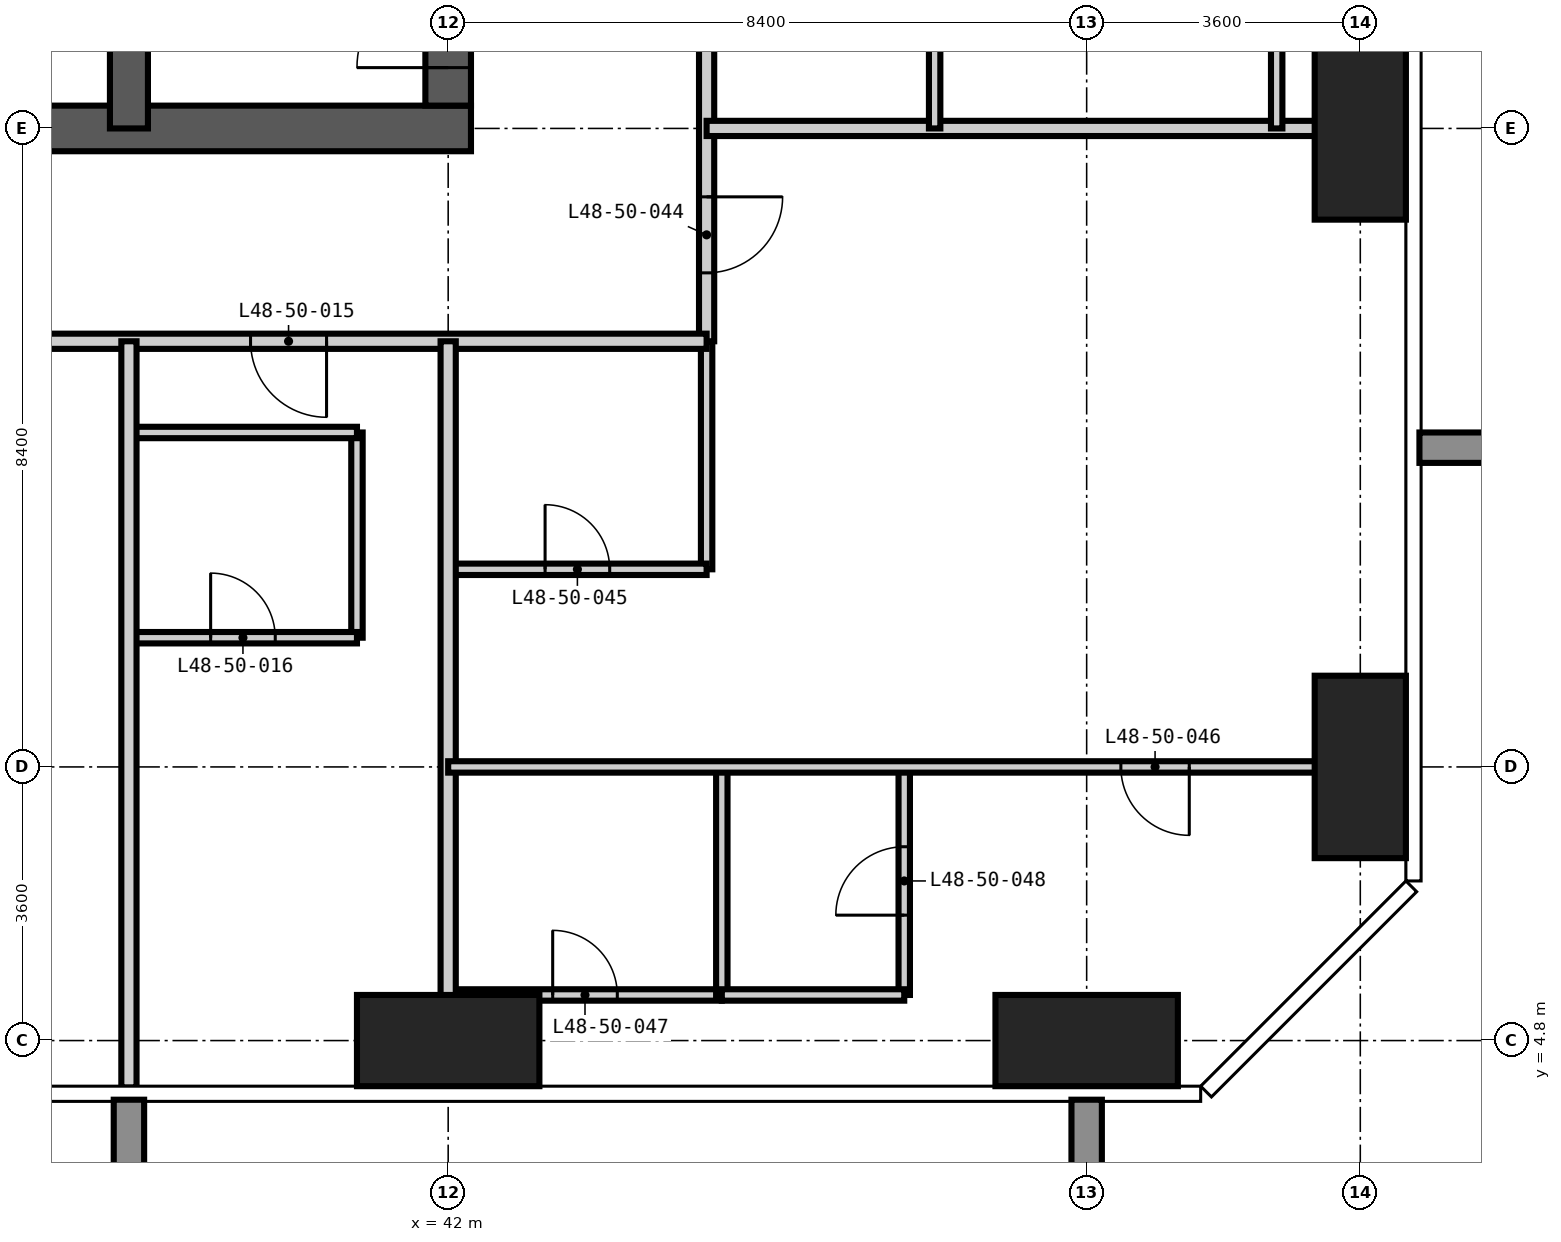
"""IFC4 building model, lengths in metres.
Left out: names, types, materials, properties, quantities, classifications, styles, units other than length and angle.
Written with IfcOpenShell. Run it as: python <this file> out.ifc"""

import sys

from ifc_helpers import new_model, si_unit, direction, frame, frame_2d, origin, origin_2d, place, context, subcontext, project, spatial, rectangle, extrude, element, fill, save


model = new_model("IFC4")
c1 = context("Model", 3, precision=1e-05, world=origin(), true_north=direction((0.0, 1.0)))
c2 = subcontext(c1, "Body", "Model", "MODEL_VIEW")
j1 = project(units=[si_unit("LENGTHUNIT", "METRE"), si_unit("PLANEANGLEUNIT", "RADIAN")], contexts=[c1])
p1 = place(None, origin())
s1 = spatial("IfcSite", under=j1, at=p1, CompositionType="ELEMENT")
p2 = place(p1, origin())
s2 = spatial("IfcBuilding", under=s1, at=p2, CompositionType="ELEMENT")
p3 = place(p2, frame((0.0, 0.0, 187.8)))
s3 = spatial("IfcBuildingStorey", under=s2, at=p3, CompositionType="ELEMENT", Elevation=187.8)
for number, where, z_axis, x_axis in (
    (1, (42.0, 4.8, -0.35), (0.0, 0.0, 1.0), (1.0, 0.0, 0.0)),
    (2, (50.4, 4.8, -0.35), (0.0, 0.0, 1.0), (1.0, 0.0, 0.0)),
):
    element("IfcColumn", number, at=place(p3, frame(where, z_axis=z_axis, x_axis=x_axis)), inside=s3, PredefinedType="COLUMN", context=c2, shape_type="SweptSolid", body=[
        extrude(rectangle(XDim=2.4, YDim=1.2, at=origin_2d()), origin(), (0.0, 0.0, 1.0), 3.6),
    ])
for number, where, z_axis, x_axis in (
    (3, (54.0, 8.4, -0.35), (0.0, 0.0, 1.0), (1.0, 0.0, 0.0)),
    (4, (54.0, 16.8, -0.35), (0.0, 0.0, 1.0), (1.0, 0.0, 0.0)),
):
    element("IfcColumn", number, at=place(p3, frame(where, z_axis=z_axis, x_axis=x_axis)), inside=s3, PredefinedType="COLUMN", context=c2, shape_type="SweptSolid", body=[
        extrude(rectangle(XDim=1.2, YDim=2.4, at=origin_2d()), origin(), (0.0, 0.0, 1.0), 3.6),
    ])
p4 = place(p3, frame((16.5, 16.8, -0.35), z_axis=(0.0, 0.0, 1.0), x_axis=(1.0, 0.0, 0.0)))
e5 = element("IfcWall", 5, at=p4, inside=s3, PredefinedType="SHEAR", context=c2, shape_type="SweptSolid", body=[
    extrude(rectangle(XDim=25.8, YDim=0.6, at=frame_2d((12.9, 0.0))), origin(), (0.0, 0.0, 1.0), 3.6),
])
p5 = place(p4, frame((12.4, 0.0, 0.35)))
e6 = element("IfcOpeningElement", 6, at=p5, cuts=e5, PredefinedType="OPENING", context=c2, shape_type="SweptSolid", body=[
    extrude(rectangle(XDim=1.0, YDim=2.1, at=frame_2d((0.5, 1.05))), frame((0.0, 0.31, 0.0), z_axis=(0.0, -1.0, 0.0), x_axis=(1.0, 0.0, 0.0)), (0.0, 0.0, 1.0), 0.62),
])
p6 = place(p4, frame((18.7, 0.0, 0.35)))
e7 = element("IfcOpeningElement", 7, at=p6, cuts=e5, PredefinedType="OPENING", context=c2, shape_type="SweptSolid", body=[
    extrude(rectangle(XDim=1.0, YDim=2.1, at=frame_2d((0.5, 1.05))), frame((0.0, 0.31, 0.0), z_axis=(0.0, -1.0, 0.0), x_axis=(1.0, 0.0, 0.0)), (0.0, 0.0, 1.0), 0.62),
])
p7 = place(p3, frame((42.0, 17.1, -0.35), z_axis=(0.0, 0.0, 1.0), x_axis=(0.0, 1.0, 0.0)))
e8 = element("IfcWall", 8, at=p7, inside=s3, PredefinedType="SHEAR", context=c2, shape_type="SweptSolid", body=[
    extrude(rectangle(XDim=24.6, YDim=0.6, at=frame_2d((12.3, 0.0))), origin(), (0.0, 0.0, 1.0), 3.6),
])
p8 = place(p7, frame((0.5, 0.0, 0.35)))
e9 = element("IfcOpeningElement", 9, at=p8, cuts=e8, PredefinedType="OPENING", context=c2, shape_type="SweptSolid", body=[
    extrude(rectangle(XDim=1.2, YDim=2.2, at=frame_2d((0.6, 1.1))), frame((0.0, 0.31, 0.0), z_axis=(0.0, -1.0, 0.0), x_axis=(1.0, 0.0, 0.0)), (0.0, 0.0, 1.0), 0.62),
])
p9 = place(p7, frame((11.8, 0.0, 0.35)))
e10 = element("IfcOpeningElement", 10, at=p9, cuts=e8, PredefinedType="OPENING", context=c2, shape_type="SweptSolid", body=[
    extrude(rectangle(XDim=1.0, YDim=2.1, at=frame_2d((0.5, 1.05))), frame((0.0, 0.31, 0.0), z_axis=(0.0, -1.0, 0.0), x_axis=(1.0, 0.0, 0.0)), (0.0, 0.0, 1.0), 0.62),
])
p10 = place(p7, frame((20.2, 0.0, 0.35)))
e11 = element("IfcOpeningElement", 11, at=p10, cuts=e8, PredefinedType="OPENING", context=c2, shape_type="SweptSolid", body=[
    extrude(rectangle(XDim=1.0, YDim=2.1, at=frame_2d((0.5, 1.05))), frame((0.0, 0.31, 0.0), z_axis=(0.0, -1.0, 0.0), x_axis=(1.0, 0.0, 0.0)), (0.0, 0.0, 1.0), 0.62),
])
p11 = place(p3, frame((37.8, 16.8, -0.35), z_axis=(0.0, 0.0, 1.0), x_axis=(0.0, 1.0, 0.0)))
e12 = element("IfcWall", 12, at=p11, inside=s3, PredefinedType="SHEAR", context=c2, shape_type="SweptSolid", body=[
    extrude(rectangle(XDim=11.2, YDim=0.5, at=frame_2d((5.6, 0.0))), origin(), (0.0, 0.0, 1.0), 3.6),
])
p12 = place(p3, frame((40.8, 10.1, 0.0), z_axis=(0.0, 0.0, 1.0), x_axis=(0.0, 1.0, 0.0)))
e13 = element("IfcWall", 13, at=p12, inside=s3, PredefinedType="PARTITIONING", context=c2, shape_type="SweptSolid", body=[
    extrude(rectangle(XDim=2.7, YDim=0.15, at=frame_2d((1.35, 0.0))), origin(), (0.0, 0.0, 1.0), 3.25),
])
p13 = place(p3, frame((45.4, 11.0, 0.0), z_axis=(0.0, 0.0, 1.0), x_axis=(0.0, 1.0, 0.0)))
e14 = element("IfcWall", 14, at=p13, inside=s3, PredefinedType="PARTITIONING", context=c2, shape_type="SweptSolid", body=[
    extrude(rectangle(XDim=3.0, YDim=0.15, at=frame_2d((1.5, 0.0))), origin(), (0.0, 0.0, 1.0), 3.25),
])
p14 = place(p3, frame((42.0, 5.4, 0.0), z_axis=(0.0, 0.0, 1.0), x_axis=(1.0, 0.0, 0.0)))
e15 = element("IfcWall", 15, at=p14, inside=s3, PredefinedType="PARTITIONING", context=c2, shape_type="SweptSolid", body=[
    extrude(rectangle(XDim=3.6, YDim=0.15, at=frame_2d((1.8, 0.0))), origin(), (0.0, 0.0, 1.0), 3.25),
])
p15 = place(p14, frame((1.375, 0.0, 0.0)))
e16 = element("IfcOpeningElement", 16, at=p15, cuts=e15, PredefinedType="OPENING", context=c2, shape_type="SweptSolid", body=[
    extrude(rectangle(XDim=0.85, YDim=2.1, at=frame_2d((0.425, 1.05))), frame((0.0, 0.085, 0.0), z_axis=(0.0, -1.0, 0.0), x_axis=(1.0, 0.0, 0.0)), (0.0, 0.0, 1.0), 0.17),
])
p16 = place(p3, frame((37.8, 10.1, 0.0), z_axis=(0.0, 0.0, 1.0), x_axis=(1.0, 0.0, 0.0)))
e17 = element("IfcWall", 17, at=p16, inside=s3, PredefinedType="PARTITIONING", context=c2, shape_type="SweptSolid", body=[
    extrude(rectangle(XDim=3.0, YDim=0.15, at=frame_2d((1.5, 0.0))), origin(), (0.0, 0.0, 1.0), 3.25),
])
p17 = place(p16, frame((1.075, 0.0, 0.0)))
e18 = element("IfcOpeningElement", 18, at=p17, cuts=e17, PredefinedType="OPENING", context=c2, shape_type="SweptSolid", body=[
    extrude(rectangle(XDim=0.85, YDim=2.1, at=frame_2d((0.425, 1.05))), frame((0.0, 0.085, 0.0), z_axis=(0.0, -1.0, 0.0), x_axis=(1.0, 0.0, 0.0)), (0.0, 0.0, 1.0), 0.17),
])
p18 = place(p3, frame((42.0, 11.0, 0.0), z_axis=(0.0, 0.0, 1.0), x_axis=(1.0, 0.0, 0.0)))
e19 = element("IfcWall", 19, at=p18, inside=s3, PredefinedType="PARTITIONING", context=c2, shape_type="SweptSolid", body=[
    extrude(rectangle(XDim=3.4, YDim=0.15, at=frame_2d((1.7, 0.0))), origin(), (0.0, 0.0, 1.0), 3.25),
])
p19 = place(p18, frame((1.275, 0.0, 0.0)))
e20 = element("IfcOpeningElement", 20, at=p19, cuts=e19, PredefinedType="OPENING", context=c2, shape_type="SweptSolid", body=[
    extrude(rectangle(XDim=0.85, YDim=2.1, at=frame_2d((0.425, 1.05))), frame((0.0, 0.085, 0.0), z_axis=(0.0, -1.0, 0.0), x_axis=(1.0, 0.0, 0.0)), (0.0, 0.0, 1.0), 0.17),
])
p20 = place(p3, frame((37.8, 12.8, 0.0), z_axis=(0.0, 0.0, 1.0), x_axis=(1.0, 0.0, 0.0)))
e21 = element("IfcWall", 21, at=p20, inside=s3, PredefinedType="PARTITIONING", context=c2, shape_type="SweptSolid", body=[
    extrude(rectangle(XDim=3.0, YDim=0.15, at=frame_2d((1.5, 0.0))), origin(), (0.0, 0.0, 1.0), 3.25),
])
p21 = place(p3, frame((45.4, 44.2, 0.0), z_axis=(0.0, 0.0, 1.0), x_axis=(0.0, -1.0, 0.0)))
e22 = element("IfcWall", 22, at=p21, inside=s3, PredefinedType="PARTITIONING", context=c2, shape_type="SweptSolid", body=[
    extrude(rectangle(XDim=30.2, YDim=0.2, at=frame_2d((15.1, 0.0))), origin(), (0.0, 0.0, 1.0), 3.25),
])
p22 = place(p21, frame((21.8, 0.0, 0.0)))
e23 = element("IfcOpeningElement", 23, at=p22, cuts=e22, PredefinedType="OPENING", context=c2, shape_type="SweptSolid", body=[
    extrude(rectangle(XDim=1.0, YDim=2.2, at=frame_2d((0.5, 1.1))), frame((0.0, 0.11, 0.0), z_axis=(0.0, -1.0, 0.0), x_axis=(1.0, 0.0, 0.0)), (0.0, 0.0, 1.0), 0.22),
])
p23 = place(p21, frame((11.0, 0.0, 0.0)))
e24 = element("IfcOpeningElement", 24, at=p23, cuts=e22, PredefinedType="OPENING", context=c2, shape_type="SweptSolid", body=[
    extrude(rectangle(XDim=1.0, YDim=2.2, at=frame_2d((0.5, 1.1))), frame((0.0, 0.11, 0.0), z_axis=(0.0, -1.0, 0.0), x_axis=(1.0, 0.0, 0.0)), (0.0, 0.0, 1.0), 0.22),
])
p24 = place(p21, frame((3.8, 0.0, 0.0)))
e25 = element("IfcOpeningElement", 25, at=p24, cuts=e22, PredefinedType="OPENING", context=c2, shape_type="SweptSolid", body=[
    extrude(rectangle(XDim=1.0, YDim=2.2, at=frame_2d((0.5, 1.1))), frame((0.0, 0.11, 0.0), z_axis=(0.0, -1.0, 0.0), x_axis=(1.0, 0.0, 0.0)), (0.0, 0.0, 1.0), 0.22),
])
p25 = place(p21, frame((28.3, 0.0, 0.0)))
e26 = element("IfcOpeningElement", 26, at=p25, cuts=e22, PredefinedType="OPENING", context=c2, shape_type="SweptSolid", body=[
    extrude(rectangle(XDim=1.0, YDim=2.2, at=frame_2d((0.5, 1.1))), frame((0.0, 0.11, 0.0), z_axis=(0.0, -1.0, 0.0), x_axis=(1.0, 0.0, 0.0)), (0.0, 0.0, 1.0), 0.22),
])
p26 = place(p21, frame((0.6, 0.0, 0.0)))
e27 = element("IfcOpeningElement", 27, at=p26, cuts=e22, PredefinedType="OPENING", context=c2, shape_type="SweptSolid", body=[
    extrude(rectangle(XDim=1.0, YDim=2.2, at=frame_2d((0.5, 1.1))), frame((0.0, 0.11, 0.0), z_axis=(0.0, -1.0, 0.0), x_axis=(1.0, 0.0, 0.0)), (0.0, 0.0, 1.0), 0.22),
])
p27 = place(p3, frame((45.4, 14.0, 0.0), z_axis=(0.0, 0.0, 1.0), x_axis=(-1.0, 0.0, 0.0)))
e28 = element("IfcWall", 28, at=p27, inside=s3, PredefinedType="PARTITIONING", context=c2, shape_type="SweptSolid", body=[
    extrude(rectangle(XDim=31.4, YDim=0.2, at=frame_2d((15.7, 0.0))), origin(), (0.0, 0.0, 1.0), 3.25),
])
p28 = place(p27, frame((26.0, 0.0, 0.0)))
e29 = element("IfcOpeningElement", 29, at=p28, cuts=e28, PredefinedType="OPENING", context=c2, shape_type="SweptSolid", body=[
    extrude(rectangle(XDim=1.0, YDim=2.2, at=frame_2d((0.5, 1.1))), frame((0.0, 0.11, 0.0), z_axis=(0.0, -1.0, 0.0), x_axis=(1.0, 0.0, 0.0)), (0.0, 0.0, 1.0), 0.22),
])
p29 = place(p27, frame((19.7, 0.0, 0.0)))
e30 = element("IfcOpeningElement", 30, at=p29, cuts=e28, PredefinedType="OPENING", context=c2, shape_type="SweptSolid", body=[
    extrude(rectangle(XDim=1.0, YDim=2.2, at=frame_2d((0.5, 1.1))), frame((0.0, 0.11, 0.0), z_axis=(0.0, -1.0, 0.0), x_axis=(1.0, 0.0, 0.0)), (0.0, 0.0, 1.0), 0.22),
])
p30 = place(p27, frame((11.3, 0.0, 0.0)))
e31 = element("IfcOpeningElement", 31, at=p30, cuts=e28, PredefinedType="OPENING", context=c2, shape_type="SweptSolid", body=[
    extrude(rectangle(XDim=1.0, YDim=2.2, at=frame_2d((0.5, 1.1))), frame((0.0, 0.11, 0.0), z_axis=(0.0, -1.0, 0.0), x_axis=(1.0, 0.0, 0.0)), (0.0, 0.0, 1.0), 0.22),
])
p31 = place(p27, frame((5.0, 0.0, 0.0)))
e32 = element("IfcOpeningElement", 32, at=p31, cuts=e28, PredefinedType="OPENING", context=c2, shape_type="SweptSolid", body=[
    extrude(rectangle(XDim=1.0, YDim=2.2, at=frame_2d((0.5, 1.1))), frame((0.0, 0.11, 0.0), z_axis=(0.0, -1.0, 0.0), x_axis=(1.0, 0.0, 0.0)), (0.0, 0.0, 1.0), 0.22),
])
for number, where, z_axis, x_axis in (
    (33, (37.8, 4.182, 0.0), (0.0, 0.0, 1.0), (0.0, 1.0, 0.0)),
    (34, (42.0, 4.182, 0.0), (0.0, 0.0, 1.0), (0.0, 1.0, 0.0)),
):
    element("IfcWall", number, at=place(p3, frame(where, z_axis=z_axis, x_axis=x_axis)), inside=s3, PredefinedType="PARTITIONING", context=c2, shape_type="SweptSolid", body=[
        extrude(rectangle(XDim=9.818, YDim=0.2, at=frame_2d((4.909, 0.0))), origin(), (0.0, 0.0, 1.0), 3.25),
    ])
p32 = place(p3, frame((45.4, 16.8, 0.0), z_axis=(0.0, 0.0, 1.0), x_axis=(1.0, 0.0, 0.0)))
e35 = element("IfcWall", 35, at=p32, inside=s3, PredefinedType="PARTITIONING", context=c2, shape_type="SweptSolid", body=[
    extrude(rectangle(XDim=9.218, YDim=0.2, at=frame_2d((4.609, 0.0))), origin(), (0.0, 0.0, 1.0), 3.25),
])
p33 = place(p3, frame((45.6, 5.4, 0.0), z_axis=(0.0, 0.0, 1.0), x_axis=(0.0, 1.0, 0.0)))
e36 = element("IfcWall", 36, at=p33, inside=s3, PredefinedType="PARTITIONING", context=c2, shape_type="SweptSolid", body=[
    extrude(rectangle(XDim=3.0, YDim=0.15, at=frame_2d((1.5, 0.0))), origin(), (0.0, 0.0, 1.0), 3.25),
])
p34 = place(p3, frame((48.0, 5.4, 0.0), z_axis=(0.0, 0.0, 1.0), x_axis=(0.0, 1.0, 0.0)))
e37 = element("IfcWall", 37, at=p34, inside=s3, PredefinedType="PARTITIONING", context=c2, shape_type="SweptSolid", body=[
    extrude(rectangle(XDim=3.0, YDim=0.15, at=frame_2d((1.5, 0.0))), origin(), (0.0, 0.0, 1.0), 3.25),
])
p35 = place(p34, frame((1.05, 0.0, 0.0)))
e38 = element("IfcOpeningElement", 38, at=p35, cuts=e37, PredefinedType="OPENING", context=c2, shape_type="SweptSolid", body=[
    extrude(rectangle(XDim=0.9, YDim=2.1, at=frame_2d((0.45, 1.05))), frame((0.0, 0.085, 0.0), z_axis=(0.0, -1.0, 0.0), x_axis=(1.0, 0.0, 0.0)), (0.0, 0.0, 1.0), 0.17),
])
for number, where, z_axis, x_axis in (
    (39, (48.4, 16.8, 0.0), (0.0, 0.0, 1.0), (0.0, 1.0, 0.0)),
    (40, (52.9, 16.8, 0.0), (0.0, 0.0, 1.0), (0.0, 1.0, 0.0)),
):
    element("IfcWall", number, at=place(p3, frame(where, z_axis=z_axis, x_axis=x_axis)), inside=s3, PredefinedType="PARTITIONING", context=c2, shape_type="SweptSolid", body=[
        extrude(rectangle(XDim=3.0, YDim=0.15, at=frame_2d((1.5, 0.0))), origin(), (0.0, 0.0, 1.0), 3.25),
    ])
p36 = place(p3, frame((45.6, 5.4, 0.0), z_axis=(0.0, 0.0, 1.0), x_axis=(1.0, 0.0, 0.0)))
e41 = element("IfcWall", 41, at=p36, inside=s3, PredefinedType="PARTITIONING", context=c2, shape_type="SweptSolid", body=[
    extrude(rectangle(XDim=2.4, YDim=0.15, at=frame_2d((1.2, 0.0))), origin(), (0.0, 0.0, 1.0), 3.25),
])
p37 = place(p3, frame((42.0, 8.4, 0.0), z_axis=(0.0, 0.0, 1.0), x_axis=(1.0, 0.0, 0.0)))
e42 = element("IfcWall", 42, at=p37, inside=s3, PredefinedType="PARTITIONING", context=c2, shape_type="SweptSolid", body=[
    extrude(rectangle(XDim=12.618, YDim=0.15, at=frame_2d((6.309, 0.0))), origin(), (0.0, 0.0, 1.0), 3.25),
])
p38 = place(p37, frame((8.85, 0.0, 0.0)))
e43 = element("IfcOpeningElement", 43, at=p38, cuts=e42, PredefinedType="OPENING", context=c2, shape_type="SweptSolid", body=[
    extrude(rectangle(XDim=0.9, YDim=2.1, at=frame_2d((0.45, 1.05))), frame((0.0, 0.085, 0.0), z_axis=(0.0, -1.0, 0.0), x_axis=(1.0, 0.0, 0.0)), (0.0, 0.0, 1.0), 0.17),
])
p39 = place(p8, origin())
e44 = element("IfcDoor", 44, at=p39, inside=s3, OperationType="SINGLE_SWING_LEFT", PredefinedType="DOOR", context=c2, shape_type="SweptSolid", body=[
    extrude(rectangle(XDim=1.2, YDim=2.2, at=frame_2d((0.6, 1.1))), frame((0.0, 0.025, 0.0), z_axis=(0.0, -1.0, 0.0), x_axis=(1.0, 0.0, 0.0)), (0.0, 0.0, 1.0), 0.05),
])
fill(e9, e44)
p40 = place(p31, origin())
e45 = element("IfcDoor", 45, at=p40, inside=s3, OperationType="SINGLE_SWING_LEFT", PredefinedType="DOOR", context=c2, shape_type="SweptSolid", body=[
    extrude(rectangle(XDim=1.0, YDim=2.2, at=frame_2d((0.5, 1.1))), frame((0.0, 0.025, 0.0), z_axis=(0.0, -1.0, 0.0), x_axis=(1.0, 0.0, 0.0)), (0.0, 0.0, 1.0), 0.05),
])
fill(e32, e45)
p41 = place(p17, origin())
e46 = element("IfcDoor", 46, at=p41, inside=s3, OperationType="SINGLE_SWING_LEFT", PredefinedType="DOOR", context=c2, shape_type="SweptSolid", body=[
    extrude(rectangle(XDim=0.85, YDim=2.1, at=frame_2d((0.425, 1.05))), frame((0.0, 0.025, 0.0), z_axis=(0.0, -1.0, 0.0), x_axis=(1.0, 0.0, 0.0)), (0.0, 0.0, 1.0), 0.05),
])
fill(e18, e46)
p42 = place(p25, origin())
e47 = element("IfcDoor", 47, at=p42, inside=s3, OperationType="SINGLE_SWING_LEFT", PredefinedType="DOOR", context=c2, shape_type="SweptSolid", body=[
    extrude(rectangle(XDim=1.0, YDim=2.2, at=frame_2d((0.5, 1.1))), frame((0.0, 0.025, 0.0), z_axis=(0.0, -1.0, 0.0), x_axis=(1.0, 0.0, 0.0)), (0.0, 0.0, 1.0), 0.05),
])
fill(e26, e47)
p43 = place(p19, origin())
e48 = element("IfcDoor", 48, at=p43, inside=s3, OperationType="SINGLE_SWING_LEFT", PredefinedType="DOOR", context=c2, shape_type="SweptSolid", body=[
    extrude(rectangle(XDim=0.85, YDim=2.1, at=frame_2d((0.425, 1.05))), frame((0.0, 0.025, 0.0), z_axis=(0.0, -1.0, 0.0), x_axis=(1.0, 0.0, 0.0)), (0.0, 0.0, 1.0), 0.05),
])
fill(e20, e48)
p44 = place(p38, frame((0.9, 0.0, 0.0), z_axis=(0.0, 0.0, 1.0), x_axis=(-1.0, 0.0, 0.0)))
e49 = element("IfcDoor", 49, at=p44, inside=s3, OperationType="SINGLE_SWING_LEFT", PredefinedType="DOOR", context=c2, shape_type="SweptSolid", body=[
    extrude(rectangle(XDim=0.9, YDim=2.1, at=frame_2d((0.45, 1.05))), frame((0.0, 0.025, 0.0), z_axis=(0.0, -1.0, 0.0), x_axis=(1.0, 0.0, 0.0)), (0.0, 0.0, 1.0), 0.05),
])
fill(e43, e49)
p45 = place(p15, origin())
e50 = element("IfcDoor", 50, at=p45, inside=s3, OperationType="SINGLE_SWING_LEFT", PredefinedType="DOOR", context=c2, shape_type="SweptSolid", body=[
    extrude(rectangle(XDim=0.85, YDim=2.1, at=frame_2d((0.425, 1.05))), frame((0.0, 0.025, 0.0), z_axis=(0.0, -1.0, 0.0), x_axis=(1.0, 0.0, 0.0)), (0.0, 0.0, 1.0), 0.05),
])
fill(e16, e50)
p46 = place(p35, origin())
e51 = element("IfcDoor", 51, at=p46, inside=s3, OperationType="SINGLE_SWING_LEFT", PredefinedType="DOOR", context=c2, shape_type="SweptSolid", body=[
    extrude(rectangle(XDim=0.9, YDim=2.1, at=frame_2d((0.45, 1.05))), frame((0.0, 0.025, 0.0), z_axis=(0.0, -1.0, 0.0), x_axis=(1.0, 0.0, 0.0)), (0.0, 0.0, 1.0), 0.05),
])
fill(e38, e51)
save(model, sys.argv[1])
